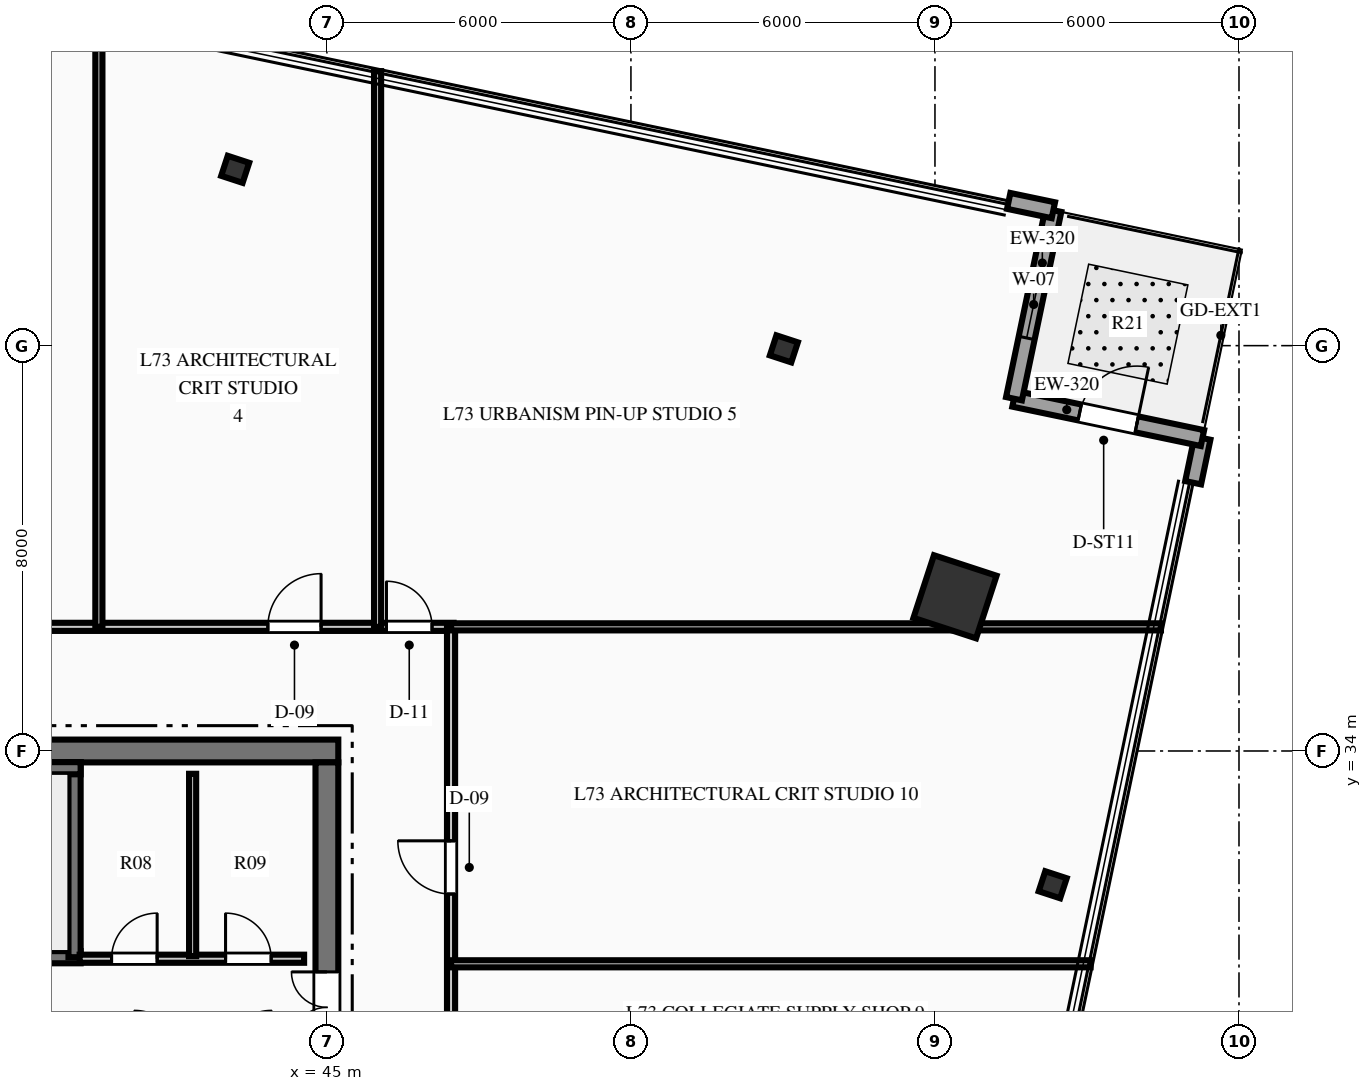
"""IFC4 building model, lengths in metres.
Left out: names, types, materials, properties, quantities, classifications, styles, units other than length and angle.
Written with IfcOpenShell. Run it as: python <this file> out.ifc"""

import sys

from ifc_helpers import new_model, si_unit, direction, frame, frame_2d, origin, origin_2d, place, context, subcontext, project, spatial, rectangle, hollow_rectangle, i_section, extrude, element, fill, save


model = new_model("IFC4")
c1 = context("Model", 3, precision=1e-05, world=origin(), true_north=direction((0.0, 1.0)))
c2 = subcontext(c1, "Body", "Model", "MODEL_VIEW")
j1 = project(units=[si_unit("LENGTHUNIT", "METRE"), si_unit("PLANEANGLEUNIT", "RADIAN")], contexts=[c1])
p1 = place(None, origin())
s1 = spatial("IfcSite", under=j1, at=p1, CompositionType="ELEMENT")
p2 = place(p1, origin())
s2 = spatial("IfcBuilding", under=s1, at=p2, CompositionType="ELEMENT")
p3 = place(p2, frame((0.0, 0.0, 289.95)))
s3 = spatial("IfcBuildingStorey", under=s2, at=p3, CompositionType="ELEMENT", Elevation=289.95)
p4 = place(p3, frame((26.775, 34.0, 0.0), z_axis=(0.0, 0.0, 1.0), x_axis=(1.0, 0.0, 0.0)))
e1 = element("IfcWall", 1, at=p4, inside=s3, PredefinedType="SHEAR", context=c2, shape_type="SweptSolid", body=[
    extrude(rectangle(XDim=18.45, YDim=0.45, at=frame_2d((9.225, 0.0))), origin(), (0.0, 0.0, 1.0), 3.75),
])
p5 = place(p3, frame((45.0, 18.225, 0.0), z_axis=(0.0, 0.0, 1.0), x_axis=(0.0, 1.0, 0.0)))
e2 = element("IfcWall", 2, at=p5, inside=s3, PredefinedType="SHEAR", context=c2, shape_type="SweptSolid", body=[
    extrude(rectangle(XDim=15.55, YDim=0.45, at=frame_2d((7.775, 0.0))), origin(), (0.0, 0.0, 1.0), 3.75),
])
p6 = place(p5, frame((10.015, 0.0, 0.0)))
e3 = element("IfcOpeningElement", 3, at=p6, cuts=e2, PredefinedType="OPENING", context=c2, shape_type="SweptSolid", body=[
    extrude(rectangle(XDim=1.4, YDim=2.2, at=frame_2d((0.7, 1.1))), frame((0.0, 0.235, 0.0), z_axis=(0.0, -1.0, 0.0), x_axis=(1.0, 0.0, 0.0)), (0.0, 0.0, 1.0), 0.47),
])
p7 = place(p3, frame((31.76, 29.93, 0.0), z_axis=(0.0, 0.0, 1.0), x_axis=(1.0, 0.0, 0.0)))
e4 = element("IfcWall", 4, at=p7, inside=s3, PredefinedType="SHEAR", context=c2, shape_type="SweptSolid", body=[
    extrude(rectangle(XDim=8.38, YDim=0.24, at=frame_2d((4.19, 0.0))), origin(), (0.0, 0.0, 1.0), 3.75),
])
p8 = place(p7, frame((0.565, 0.0, 0.0)))
e5 = element("IfcOpeningElement", 5, at=p8, cuts=e4, PredefinedType="OPENING", context=c2, shape_type="SweptSolid", body=[
    extrude(rectangle(XDim=1.05, YDim=2.15, at=frame_2d((0.525, 1.075))), frame((0.0, 0.13, 0.0), z_axis=(0.0, -1.0, 0.0), x_axis=(1.0, 0.0, 0.0)), (0.0, 0.0, 1.0), 0.26),
])
p9 = place(p3, frame((40.02, 29.93, 0.0), z_axis=(0.0, 0.0, 1.0), x_axis=(0.0, 1.0, 0.0)))
e6 = element("IfcWall", 6, at=p9, inside=s3, PredefinedType="SHEAR", context=c2, shape_type="SweptSolid", body=[
    extrude(rectangle(XDim=3.85, YDim=0.24, at=frame_2d((1.925, 0.0))), origin(), (0.0, 0.0, 1.0), 3.75),
])
p10 = place(p3, frame((37.85, 33.66, 0.0), z_axis=(0.0, 0.0, 1.0), x_axis=(1.0, 0.0, 0.0)))
e7 = element("IfcWall", 7, at=p10, inside=s3, PredefinedType="SHEAR", context=c2, shape_type="SweptSolid", body=[
    extrude(rectangle(XDim=2.29, YDim=0.24, at=frame_2d((1.145, 0.0))), origin(), (0.0, 0.0, 1.0), 3.75),
])
p11 = place(p3, frame((57.396, 37.043, 0.0), z_axis=(0.0, 0.0, 1.0), x_axis=(0.311008203279, 0.950407227189, 0.0)))
e8 = element("IfcColumn", 8, at=p11, inside=s3, PredefinedType="COLUMN", context=c2, shape_type="SweptSolid", body=[
    extrude(hollow_rectangle(XDim=1.3, YDim=1.3, WallThickness=0.06, at=origin_2d()), origin(), (0.0, 0.0, 1.0), 3.75),
])
for number, where, z_axis, x_axis in (
    (9, (59.324, 31.36, 0.0), (0.0, 0.0, 1.0), (0.311, 0.95, 0.0)),
    (10, (54.018, 41.937, 0.0), (0.0, 0.0, 1.0), (0.311, 0.95, 0.0)),
    (11, (43.19, 45.48, 0.0), (0.0, 0.0, 1.0), (0.311, 0.95, 0.0)),
):
    element("IfcColumn", number, at=place(p3, frame(where, z_axis=z_axis, x_axis=x_axis)), inside=s3, PredefinedType="COLUMN", context=c2, shape_type="SweptSolid", body=[
        extrude(i_section(OverallWidth=0.416, OverallDepth=0.445, WebThickness=0.039, FlangeThickness=0.063, at=origin_2d()), origin(), (0.0, 0.0, 1.0), 3.75),
    ])
p12 = place(p3, frame((62.279, 40.176, 0.0), z_axis=(0.0, 0.0, 1.0), x_axis=(-0.204560917907, -0.978853835292, 0.0)))
e12 = element("IfcWall", 12, at=p12, inside=s3, PredefinedType="STANDARD", context=c2, shape_type="SweptSolid", body=[
    extrude(rectangle(XDim=0.9, YDim=0.32, at=frame_2d((0.45, 0.0))), origin(), (0.0, 0.0, 1.0), 3.34),
])
p13 = place(p3, frame((58.56, 40.953, 0.0), z_axis=(0.0, 0.0, 1.0), x_axis=(0.978866954506, -0.204498130493, 0.0)))
e13 = element("IfcWall", 13, at=p13, inside=s3, PredefinedType="STANDARD", context=c2, shape_type="SweptSolid", body=[
    extrude(rectangle(XDim=3.8, YDim=0.32, at=frame_2d((1.9, 0.0))), origin(), (0.0, 0.0, 1.0), 3.34),
])
p14 = place(p13, frame((1.325, 0.0, 0.0)))
e14 = element("IfcOpeningElement", 14, at=p14, cuts=e13, PredefinedType="OPENING", context=c2, shape_type="SweptSolid", body=[
    extrude(rectangle(XDim=1.15, YDim=2.2, at=frame_2d((0.575, 1.1))), frame((0.0, 0.17, 0.0), z_axis=(0.0, -1.0, 0.0), x_axis=(1.0, 0.0, 0.0)), (0.0, 0.0, 1.0), 0.34),
])
p15 = place(p3, frame((59.337, 44.672, 0.0), z_axis=(0.0, 0.0, 1.0), x_axis=(-0.204498130493, -0.978866954506, 0.0)))
e15 = element("IfcWall", 15, at=p15, inside=s3, PredefinedType="STANDARD", context=c2, shape_type="SweptSolid", body=[
    extrude(rectangle(XDim=3.8, YDim=0.32, at=frame_2d((1.9, 0.0))), origin(), (0.0, 0.0, 1.0), 3.34),
])
p16 = place(p15, frame((1.225, 0.0, 0.85)))
e16 = element("IfcOpeningElement", 16, at=p16, cuts=e15, PredefinedType="OPENING", context=c2, shape_type="SweptSolid", body=[
    extrude(rectangle(XDim=1.35, YDim=1.95, at=frame_2d((0.675, 0.975))), frame((0.0, 0.17, 0.0), z_axis=(0.0, -1.0, 0.0), x_axis=(1.0, 0.0, 0.0)), (0.0, 0.0, 1.0), 0.34),
])
p17 = place(p3, frame((58.456, 44.856, 0.0), z_axis=(0.0, 0.0, 1.0), x_axis=(0.978865183405, -0.204506608004, 0.0)))
e17 = element("IfcWall", 17, at=p17, inside=s3, PredefinedType="STANDARD", context=c2, shape_type="SweptSolid", body=[
    extrude(rectangle(XDim=0.9, YDim=0.32, at=frame_2d((0.45, 0.0))), origin(), (0.0, 0.0, 1.0), 3.34),
])
p18 = place(p3, frame((40.12, 29.9, 0.0), z_axis=(0.0, 0.0, 1.0), x_axis=(1.0, 0.0, 0.0)))
e18 = element("IfcWall", 18, at=p18, inside=s3, PredefinedType="PARTITIONING", context=c2, shape_type="SweptSolid", body=[
    extrude(rectangle(XDim=4.43, YDim=0.16, at=frame_2d((2.215, 0.0))), origin(), (0.0, 0.0, 1.0), 3.34),
])
p19 = place(p18, frame((0.63, 0.0, 0.0)))
e19 = element("IfcOpeningElement", 19, at=p19, cuts=e18, PredefinedType="OPENING", context=c2, shape_type="SweptSolid", body=[
    extrude(rectangle(XDim=0.9, YDim=2.15, at=frame_2d((0.45, 1.075))), frame((0.0, 0.09, 0.0), z_axis=(0.0, -1.0, 0.0), x_axis=(1.0, 0.0, 0.0)), (0.0, 0.0, 1.0), 0.18),
])
p20 = place(p18, frame((2.88, 0.0, 0.0)))
e20 = element("IfcOpeningElement", 20, at=p20, cuts=e18, PredefinedType="OPENING", context=c2, shape_type="SweptSolid", body=[
    extrude(rectangle(XDim=0.9, YDim=2.15, at=frame_2d((0.45, 1.075))), frame((0.0, 0.09, 0.0), z_axis=(0.0, -1.0, 0.0), x_axis=(1.0, 0.0, 0.0)), (0.0, 0.0, 1.0), 0.18),
])
p21 = place(p3, frame((42.35, 29.95, 0.0), z_axis=(0.0, 0.0, 1.0), x_axis=(0.0, 1.0, 0.0)))
e21 = element("IfcWall", 21, at=p21, inside=s3, PredefinedType="PARTITIONING", context=c2, shape_type="SweptSolid", body=[
    extrude(rectangle(XDim=3.6, YDim=0.14, at=frame_2d((1.8, 0.0))), origin(), (0.0, 0.0, 1.0), 3.34),
])
p22 = place(p3, frame((37.25, 36.45, 0.0), z_axis=(0.0, 0.0, 1.0), x_axis=(1.0, 0.0, 0.0)))
e22 = element("IfcWall", 22, at=p22, inside=s3, PredefinedType="PARTITIONING", context=c2, shape_type="SweptSolid", body=[
    extrude(rectangle(XDim=10.25, YDim=0.16, at=frame_2d((5.125, 0.0))), origin(), (0.0, 0.0, 1.0), 3.34),
])
p23 = place(p22, frame((6.585, 0.0, 0.0)))
e23 = element("IfcOpeningElement", 23, at=p23, cuts=e22, PredefinedType="OPENING", context=c2, shape_type="SweptSolid", body=[
    extrude(rectangle(XDim=1.05, YDim=2.15, at=frame_2d((0.525, 1.075))), frame((0.0, 0.09, 0.0), z_axis=(0.0, -1.0, 0.0), x_axis=(1.0, 0.0, 0.0)), (0.0, 0.0, 1.0), 0.18),
])
p24 = place(p22, frame((8.925, 0.0, 0.0)))
e24 = element("IfcOpeningElement", 24, at=p24, cuts=e22, PredefinedType="OPENING", context=c2, shape_type="SweptSolid", body=[
    extrude(rectangle(XDim=0.9, YDim=2.15, at=frame_2d((0.45, 1.075))), frame((0.0, 0.09, 0.0), z_axis=(0.0, -1.0, 0.0), x_axis=(1.0, 0.0, 0.0)), (0.0, 0.0, 1.0), 0.18),
])
p25 = place(p3, frame((47.45, 27.25, 0.0), z_axis=(0.0, 0.0, 1.0), x_axis=(0.0, 1.0, 0.0)))
e25 = element("IfcWall", 25, at=p25, inside=s3, PredefinedType="PARTITIONING", context=c2, shape_type="SweptSolid", body=[
    extrude(rectangle(XDim=9.2, YDim=0.16, at=frame_2d((4.6, 0.0))), origin(), (0.0, 0.0, 1.0), 3.34),
])
p26 = place(p25, frame((3.927, 0.0, 0.0)))
e26 = element("IfcOpeningElement", 26, at=p26, cuts=e25, PredefinedType="OPENING", context=c2, shape_type="SweptSolid", body=[
    extrude(rectangle(XDim=1.05, YDim=2.15, at=frame_2d((0.525, 1.075))), frame((0.0, 0.09, 0.0), z_axis=(0.0, -1.0, 0.0), x_axis=(1.0, 0.0, 0.0)), (0.0, 0.0, 1.0), 0.18),
])
p27 = place(p3, frame((47.45, 36.45, 0.0), z_axis=(0.0, 0.0, 1.0), x_axis=(1.0, 0.0, 0.0)))
e27 = element("IfcWall", 27, at=p27, inside=s3, PredefinedType="PARTITIONING", context=c2, shape_type="SweptSolid", body=[
    extrude(rectangle(XDim=14.01, YDim=0.14, at=frame_2d((7.005, 0.0))), origin(), (0.0, 0.0, 1.0), 2.718),
])
p28 = place(p3, frame((40.5, 36.45, 0.0), z_axis=(0.0, 0.0, 1.0), x_axis=(0.0, 1.0, 0.0)))
e28 = element("IfcWall", 28, at=p28, inside=s3, PredefinedType="PARTITIONING", context=c2, shape_type="SweptSolid", body=[
    extrude(rectangle(XDim=12.117, YDim=0.14, at=frame_2d((6.058, 0.0))), origin(), (0.0, 0.0, 1.0), 3.34),
])
p29 = place(p3, frame((46.0, 36.45, 0.0), z_axis=(0.0, 0.0, 1.0), x_axis=(0.0, 1.0, 0.0)))
e29 = element("IfcWall", 29, at=p29, inside=s3, PredefinedType="PARTITIONING", context=c2, shape_type="SweptSolid", body=[
    extrude(rectangle(XDim=10.968, YDim=0.14, at=frame_2d((5.484, 0.0))), origin(), (0.0, 0.0, 1.0), 3.34),
])
p30 = place(p3, frame((47.45, 29.8, 0.0), z_axis=(0.0, 0.0, 1.0), x_axis=(1.0, 0.0, 0.0)))
e30 = element("IfcWall", 30, at=p30, inside=s3, PredefinedType="PARTITIONING", context=c2, shape_type="SweptSolid", body=[
    extrude(rectangle(XDim=12.621, YDim=0.14, at=frame_2d((6.311, 0.0))), origin(), (0.0, 0.0, 1.0), 3.34),
])
p31 = place(p14, origin())
e31 = element("IfcDoor", 31, at=p31, inside=s3, OperationType="SINGLE_SWING_RIGHT", PredefinedType="DOOR", context=c2, shape_type="SweptSolid", body=[
    extrude(rectangle(XDim=1.15, YDim=2.2, at=frame_2d((0.575, 1.1))), frame((0.0, 0.025, 0.0), z_axis=(0.0, -1.0, 0.0), x_axis=(1.0, 0.0, 0.0)), (0.0, 0.0, 1.0), 0.05),
])
fill(e14, e31)
p32 = place(p16, origin())
e32 = element("IfcWindow", 32, at=p32, inside=s3, PartitioningType="SINGLE_PANEL", PredefinedType="WINDOW", context=c2, shape_type="SweptSolid", body=[
    extrude(rectangle(XDim=1.35, YDim=1.95, at=frame_2d((0.675, 0.975))), frame((0.0, 0.03, 0.0), z_axis=(0.0, -1.0, 0.0), x_axis=(1.0, 0.0, 0.0)), (0.0, 0.0, 1.0), 0.06),
])
fill(e16, e32)
p33 = place(p19, origin())
e33 = element("IfcDoor", 33, at=p33, inside=s3, OperationType="SINGLE_SWING_RIGHT", PredefinedType="DOOR", context=c2, shape_type="SweptSolid", body=[
    extrude(rectangle(XDim=0.9, YDim=2.15, at=frame_2d((0.45, 1.075))), frame((0.0, 0.025, 0.0), z_axis=(0.0, -1.0, 0.0), x_axis=(1.0, 0.0, 0.0)), (0.0, 0.0, 1.0), 0.05),
])
fill(e19, e33)
p34 = place(p20, origin())
e34 = element("IfcDoor", 34, at=p34, inside=s3, OperationType="SINGLE_SWING_LEFT", PredefinedType="DOOR", context=c2, shape_type="SweptSolid", body=[
    extrude(rectangle(XDim=0.9, YDim=2.15, at=frame_2d((0.45, 1.075))), frame((0.0, 0.025, 0.0), z_axis=(0.0, -1.0, 0.0), x_axis=(1.0, 0.0, 0.0)), (0.0, 0.0, 1.0), 0.05),
])
fill(e20, e34)
p35 = place(p6, origin())
e35 = element("IfcDoor", 35, at=p35, inside=s3, OperationType="DOUBLE_DOOR_SINGLE_SWING", PredefinedType="DOOR", context=c2, shape_type="SweptSolid", body=[
    extrude(rectangle(XDim=1.4, YDim=2.2, at=frame_2d((0.7, 1.1))), frame((0.0, 0.025, 0.0), z_axis=(0.0, -1.0, 0.0), x_axis=(1.0, 0.0, 0.0)), (0.0, 0.0, 1.0), 0.05),
])
fill(e3, e35)
p36 = place(p23, origin())
e36 = element("IfcDoor", 36, at=p36, inside=s3, OperationType="SINGLE_SWING_RIGHT", PredefinedType="DOOR", context=c2, shape_type="SweptSolid", body=[
    extrude(rectangle(XDim=1.05, YDim=2.15, at=frame_2d((0.525, 1.075))), frame((0.0, 0.025, 0.0), z_axis=(0.0, -1.0, 0.0), x_axis=(1.0, 0.0, 0.0)), (0.0, 0.0, 1.0), 0.05),
])
fill(e23, e36)
p37 = place(p24, origin())
e37 = element("IfcDoor", 37, at=p37, inside=s3, OperationType="SINGLE_SWING_LEFT", PredefinedType="DOOR", context=c2, shape_type="SweptSolid", body=[
    extrude(rectangle(XDim=0.9, YDim=2.15, at=frame_2d((0.45, 1.075))), frame((0.0, 0.025, 0.0), z_axis=(0.0, -1.0, 0.0), x_axis=(1.0, 0.0, 0.0)), (0.0, 0.0, 1.0), 0.05),
])
fill(e24, e37)
p38 = place(p26, origin())
e38 = element("IfcDoor", 38, at=p38, inside=s3, OperationType="SINGLE_SWING_RIGHT", PredefinedType="DOOR", context=c2, shape_type="SweptSolid", body=[
    extrude(rectangle(XDim=1.05, YDim=2.15, at=frame_2d((0.525, 1.075))), frame((0.0, 0.025, 0.0), z_axis=(0.0, -1.0, 0.0), x_axis=(1.0, 0.0, 0.0)), (0.0, 0.0, 1.0), 0.05),
])
fill(e26, e38)
save(model, sys.argv[1])
